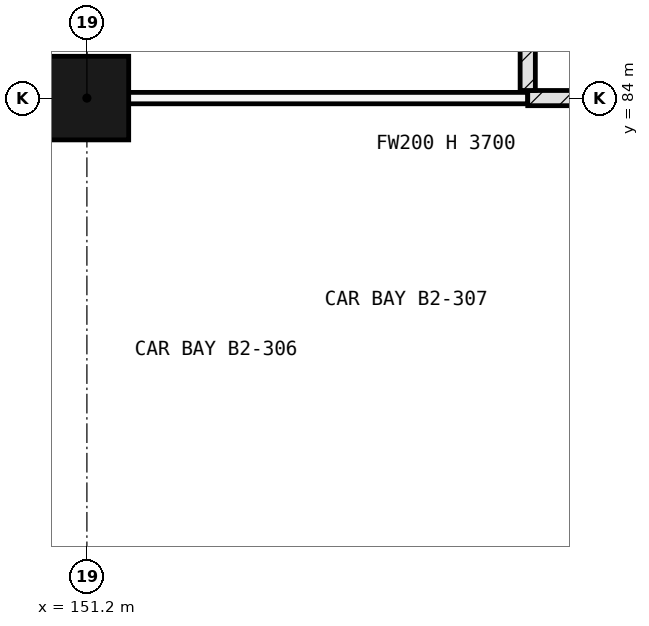
"""IFC4 building model, lengths in metres.
Left out: names, types, materials, properties, quantities, classifications, styles, units other than length and angle.
Written with IfcOpenShell. Run it as: python <this file> out.ifc"""

import sys

from ifc_helpers import new_model, si_unit, direction, frame, frame_2d, origin, origin_2d, place, context, subcontext, project, spatial, rectangle, extrude, element, save


model = new_model("IFC4")
c1 = context("Model", 3, precision=1e-05, world=origin(), true_north=direction((0.0, 1.0)))
c2 = subcontext(c1, "Body", "Model", "MODEL_VIEW")
j1 = project(units=[si_unit("LENGTHUNIT", "METRE"), si_unit("PLANEANGLEUNIT", "RADIAN")], contexts=[c1])
p1 = place(None, origin())
s1 = spatial("IfcSite", under=j1, at=p1, CompositionType="ELEMENT")
p2 = place(p1, origin())
s2 = spatial("IfcBuilding", under=s1, at=p2, CompositionType="ELEMENT")
p3 = place(p2, frame((0.0, 0.0, -9.6)))
s3 = spatial("IfcBuildingStorey", under=s2, at=p3, CompositionType="ELEMENT", Elevation=-9.6)
p4 = place(p3, frame((151.2, 84.0, -0.25), z_axis=(0.0, 0.0, 1.0), x_axis=(1.0, 0.0, 0.0)))
e1 = element("IfcColumn", 1, at=p4, inside=s3, PredefinedType="COLUMN", context=c2, shape_type="SweptSolid", body=[
    extrude(rectangle(XDim=1.1, YDim=1.1, at=origin_2d()), origin(), (0.0, 0.0, 1.0), 4.75),
])
p5 = place(p3, frame((143.1, 84.0, 0.0), z_axis=(0.0, 0.0, 1.0), x_axis=(1.0, 0.0, 0.0)))
e2 = element("IfcWall", 2, at=p5, inside=s3, PredefinedType="PARTITIONING", context=c2, shape_type="SweptSolid", body=[
    extrude(rectangle(XDim=13.9, YDim=0.15, at=frame_2d((6.95, 0.0))), origin(), (0.0, 0.0, 1.0), 3.7),
])
p6 = place(p5, frame((5.6, 0.0, 0.0)))
e3 = element("IfcOpeningElement", 3, at=p6, cuts=e2, PredefinedType="OPENING", context=c2, shape_type="SweptSolid", body=[
    extrude(rectangle(XDim=1.8, YDim=2.1, at=frame_2d((0.9, 1.05))), frame((0.0, 0.085, 0.0), z_axis=(0.0, -1.0, 0.0), x_axis=(1.0, 0.0, 0.0)), (0.0, 0.0, 1.0), 0.17),
])
p7 = place(p3, frame((157.0, 84.0, 0.0), z_axis=(0.0, 0.0, 1.0), x_axis=(1.0, 0.0, 0.0)))
e4 = element("IfcWall", 4, at=p7, inside=s3, PredefinedType="SOLIDWALL", context=c2, shape_type="SweptSolid", body=[
    extrude(rectangle(XDim=2.6, YDim=0.2, at=frame_2d((1.3, 0.0))), origin(), (0.0, 0.0, 1.0), 3.7),
])
p8 = place(p7, frame((0.8, 0.0, 0.0)))
e5 = element("IfcOpeningElement", 5, at=p8, cuts=e4, PredefinedType="OPENING", context=c2, shape_type="SweptSolid", body=[
    extrude(rectangle(XDim=1.0, YDim=2.1, at=frame_2d((0.5, 1.05))), frame((0.0, 0.11, 0.0), z_axis=(0.0, -1.0, 0.0), x_axis=(1.0, 0.0, 0.0)), (0.0, 0.0, 1.0), 0.22),
])
p9 = place(p3, frame((157.0, 84.1, 0.0), z_axis=(0.0, 0.0, 1.0), x_axis=(0.0, 1.0, 0.0)))
e6 = element("IfcWall", 6, at=p9, inside=s3, PredefinedType="SOLIDWALL", context=c2, shape_type="SweptSolid", body=[
    extrude(rectangle(XDim=8.05, YDim=0.2, at=frame_2d((4.025, 0.0))), origin(), (0.0, 0.0, 1.0), 4.5),
])
save(model, sys.argv[1])
